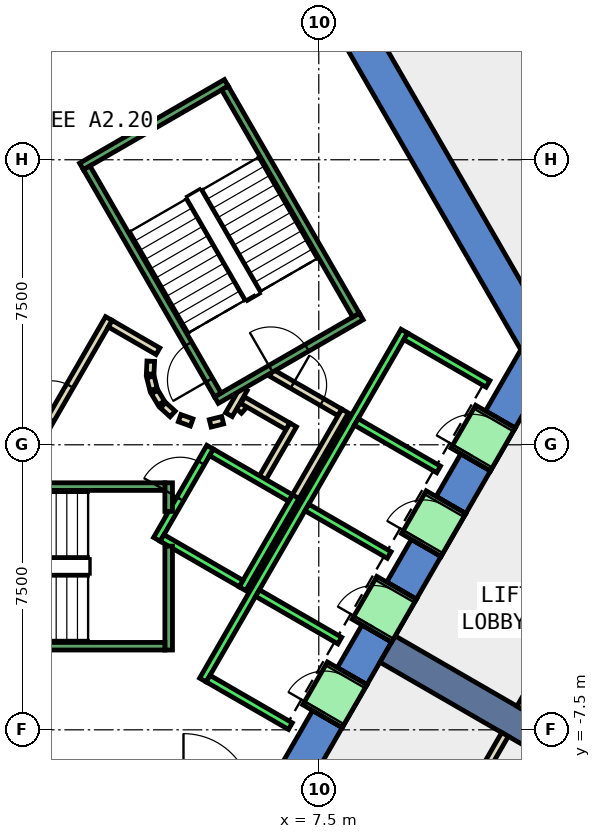
"""IFC4 building model, lengths in metres.
Left out: names, types, materials, properties, quantities, classifications, styles, units other than length and angle.
Written with IfcOpenShell. Run it as: python <this file> out.ifc"""

import sys

from ifc_helpers import new_model, si_unit, direction, frame, frame_2d, origin, place, context, subcontext, project, spatial, polyline, rectangle, outline, extrude, element, fill, save


model = new_model("IFC4")
c1 = context("Model", 3, precision=1e-05, world=origin(), true_north=direction((0.0, 1.0)))
c2 = subcontext(c1, "Body", "Model", "MODEL_VIEW")
j1 = project(units=[si_unit("LENGTHUNIT", "METRE"), si_unit("PLANEANGLEUNIT", "RADIAN")], contexts=[c1])
p1 = place(None, origin())
s1 = spatial("IfcSite", under=j1, at=p1, CompositionType="ELEMENT")
p2 = place(p1, origin())
s2 = spatial("IfcBuilding", under=s1, at=p2, CompositionType="ELEMENT")
p3 = place(p2, frame((0.0, 0.0, 90.8)))
s3 = spatial("IfcBuildingStorey", under=s2, at=p3, CompositionType="ELEMENT", Elevation=90.8)
p4 = place(p3, frame((0.0, 0.0, -0.4)))
e1 = element("IfcWall", 1, at=p4, inside=s3, PredefinedType="SHEAR", context=c2, shape_type="SweptSolid", body=[
    extrude(outline(polyline([(8.517, 11.748), (7.738, 11.298), (12.817, 2.5), (13.856, 2.5), (8.517, 11.748)])), origin(), (0.0, 0.0, 1.0), 4.2),
])
p5 = place(p3, frame((0.0, 0.0, -0.4)))
e2 = element("IfcWall", 2, at=p5, inside=s3, PredefinedType="SHEAR", context=c2, shape_type="SweptSolid", body=[
    extrude(outline(polyline([(8.117, -7.44), (7.338, -6.99), (6.409, -8.6), (6.928, -9.5), (8.117, -7.44)])), origin(), (0.0, 0.0, 1.0), 4.2),
])
p6 = place(p3, frame((0.0, 0.0, -0.4)))
e3 = element("IfcWall", 3, at=p6, inside=s3, PredefinedType="SHEAR", context=c2, shape_type="SweptSolid", body=[
    extrude(outline(polyline([(9.417, -5.189), (8.638, -4.739), (7.988, -5.864), (8.767, -6.314), (9.417, -5.189)])), origin(), (0.0, 0.0, 1.0), 4.2),
])
p7 = place(p3, frame((0.0, 0.0, -0.4)))
e4 = element("IfcWall", 4, at=p7, inside=s3, PredefinedType="SHEAR", context=c2, shape_type="SweptSolid", body=[
    extrude(outline(polyline([(10.717, -2.937), (9.938, -2.487), (9.288, -3.613), (10.067, -4.063), (10.717, -2.937)])), origin(), (0.0, 0.0, 1.0), 4.2),
])
p8 = place(p3, frame((0.0, 0.0, -0.4)))
e5 = element("IfcWall", 5, at=p8, inside=s3, PredefinedType="SHEAR", context=c2, shape_type="SweptSolid", body=[
    extrude(outline(polyline([(12.017, -0.686), (11.238, -0.236), (10.588, -1.361), (11.367, -1.811), (12.017, -0.686)])), origin(), (0.0, 0.0, 1.0), 4.2),
])
p9 = place(p3, frame((0.0, 0.0, -0.4)))
e6 = element("IfcWall", 6, at=p9, inside=s3, PredefinedType="SHEAR", context=c2, shape_type="SweptSolid", body=[
    extrude(outline(polyline([(11.888, 0.89), (12.667, 0.44), (13.856, 2.5), (12.817, 2.5), (11.888, 0.89)])), origin(), (0.0, 0.0, 1.0), 4.2),
])
p10 = place(p3, frame((0.0, 0.0, 3.6)))
e7 = element("IfcWall", 7, at=p10, inside=s3, PredefinedType="SHEAR", context=c2, shape_type="SweptSolid", body=[
    extrude(outline(polyline([(8.767, -6.314), (7.988, -5.864), (7.338, -6.99), (8.117, -7.44), (8.767, -6.314)])), origin(), (0.0, 0.0, 1.0), 0.2),
])
p11 = place(p3, frame((0.0, 0.0, 3.6)))
e8 = element("IfcWall", 8, at=p11, inside=s3, PredefinedType="SHEAR", context=c2, shape_type="SweptSolid", body=[
    extrude(outline(polyline([(10.067, -4.063), (9.288, -3.613), (8.638, -4.739), (9.417, -5.189), (10.067, -4.063)])), origin(), (0.0, 0.0, 1.0), 0.2),
])
p12 = place(p3, frame((0.0, 0.0, 3.6)))
e9 = element("IfcWall", 9, at=p12, inside=s3, PredefinedType="SHEAR", context=c2, shape_type="SweptSolid", body=[
    extrude(outline(polyline([(11.367, -1.811), (10.588, -1.361), (9.938, -2.487), (10.717, -2.937), (11.367, -1.811)])), origin(), (0.0, 0.0, 1.0), 0.2),
])
p13 = place(p3, frame((0.0, 0.0, 3.6)))
e10 = element("IfcWall", 10, at=p13, inside=s3, PredefinedType="SHEAR", context=c2, shape_type="SweptSolid", body=[
    extrude(outline(polyline([(12.667, 0.44), (11.888, 0.89), (11.238, -0.236), (12.017, -0.686), (12.667, 0.44)])), origin(), (0.0, 0.0, 1.0), 0.2),
])
p14 = place(p3, frame((9.31, -5.375, -0.4), z_axis=(0.0, 0.0, 1.0), x_axis=(0.866017533419, -0.500013631625, 0.0)))
e11 = element("IfcWall", 11, at=p14, inside=s3, PredefinedType="SHEAR", context=c2, shape_type="SweptSolid", body=[
    extrude(rectangle(XDim=9.0, YDim=0.8, at=frame_2d((4.5, 0.0))), origin(), (0.0, 0.0, 1.0), 4.2),
])
p15 = place(p3, frame((12.652, 15.602, 0.0), z_axis=(0.0, 0.0, 1.0), x_axis=(0.504914693075, -0.863169249172, 0.0)))
e12 = element("IfcWall", 12, at=p15, inside=s3, PredefinedType="PARTITIONING", context=c2, shape_type="SweptSolid", body=[
    extrude(rectangle(XDim=7.11, YDim=0.2, at=frame_2d((3.555, 0.0))), origin(), (0.0, 0.0, 1.0), 3.8),
])
p16 = place(p15, frame((3.13, 0.0, 0.0)))
e13 = element("IfcOpeningElement", 13, at=p16, cuts=e12, PredefinedType="OPENING", context=c2, shape_type="SweptSolid", body=[
    extrude(rectangle(XDim=1.0, YDim=2.1, at=frame_2d((0.5, 1.05))), frame((0.0, 0.11, 0.0), z_axis=(0.0, -1.0, 0.0), x_axis=(1.0, 0.0, 0.0)), (0.0, 0.0, 1.0), 0.22),
])
p17 = place(p3, frame((5.39, 0.898, 0.0), z_axis=(0.0, 0.0, 1.0), x_axis=(0.673828488714, 0.738887791073, 0.0)))
e14 = element("IfcWall", 14, at=p17, inside=s3, PredefinedType="PARTITIONING", context=c2, shape_type="SweptSolid", body=[
    extrude(rectangle(XDim=0.263, YDim=0.2, at=frame_2d((0.131, 0.0))), origin(), (0.0, 0.0, 1.0), 3.8),
])
p18 = place(p3, frame((5.499, 1.172, 0.0), z_axis=(0.0, 0.0, 1.0), x_axis=(0.866333505267, -0.499465972466, 0.0)))
e15 = element("IfcWall", 15, at=p18, inside=s3, PredefinedType="PARTITIONING", context=c2, shape_type="SweptSolid", body=[
    extrude(rectangle(XDim=1.374, YDim=0.2, at=frame_2d((0.687, 0.0))), origin(), (0.0, 0.0, 1.0), 3.8),
])
p19 = place(p3, frame((6.826, 0.522, 0.0), z_axis=(0.0, 0.0, 1.0), x_axis=(-0.500016722714, -0.866015748706, 0.0)))
e16 = element("IfcWall", 16, at=p19, inside=s3, PredefinedType="PARTITIONING", context=c2, shape_type="SweptSolid", body=[
    extrude(rectangle(XDim=1.7, YDim=0.2, at=frame_2d((0.85, 0.0))), origin(), (0.0, 0.0, 1.0), 3.8),
])
p20 = place(p3, frame((6.25, 1.894, 0.0), z_axis=(0.0, 0.0, 1.0), x_axis=(0.866043184279, -0.499969202016, 0.0)))
e17 = element("IfcWall", 17, at=p20, inside=s3, PredefinedType="PARTITIONING", context=c2, shape_type="SweptSolid", body=[
    extrude(rectangle(XDim=2.084, YDim=0.2, at=frame_2d((1.042, 0.0))), origin(), (0.0, 0.0, 1.0), 3.8),
])
p21 = place(p20, frame((0.642, 0.0, 0.0)))
e18 = element("IfcOpeningElement", 18, at=p21, cuts=e17, PredefinedType="OPENING", context=c2, shape_type="SweptSolid", body=[
    extrude(rectangle(XDim=0.9, YDim=2.1, at=frame_2d((0.45, 1.05))), frame((0.0, 0.11, 0.0), z_axis=(0.0, -1.0, 0.0), x_axis=(1.0, 0.0, 0.0)), (0.0, 0.0, 1.0), 0.22),
])
p22 = place(p3, frame((8.192, 0.888, 0.0), z_axis=(0.0, 0.0, 1.0), x_axis=(-0.499940625693, -0.866059680843, 0.0)))
e19 = element("IfcWall", 19, at=p22, inside=s3, PredefinedType="PARTITIONING", context=c2, shape_type="SweptSolid", body=[
    extrude(rectangle(XDim=2.68, YDim=0.2, at=frame_2d((1.34, 0.0))), origin(), (0.0, 0.0, 1.0), 3.8),
])
p23 = place(p3, frame((5.135, 0.793, 0.0), z_axis=(0.0, 0.0, 1.0), x_axis=(0.499526442893, 0.866298639529, 0.0)))
e20 = element("IfcWall", 20, at=p23, inside=s3, PredefinedType="PARTITIONING", context=c2, shape_type="SweptSolid", body=[
    extrude(rectangle(XDim=0.791, YDim=0.2, at=frame_2d((0.396, 0.0))), origin(), (0.0, 0.0, 1.0), 3.8),
])
p24 = place(p3, frame((-0.52, -1.0, 0.0), z_axis=(0.0, 0.0, 1.0), x_axis=(0.50011622646, 0.865958290007, 0.0)))
e21 = element("IfcWall", 21, at=p24, inside=s3, PredefinedType="PARTITIONING", context=c2, shape_type="SweptSolid", body=[
    extrude(rectangle(XDim=4.991, YDim=0.2, at=frame_2d((2.496, 0.0))), origin(), (0.0, 0.0, 1.0), 3.8),
])
p25 = place(p24, frame((1.945, 0.0, 0.0)))
e22 = element("IfcOpeningElement", 22, at=p25, cuts=e21, PredefinedType="OPENING", context=c2, shape_type="SweptSolid", body=[
    extrude(rectangle(XDim=1.0, YDim=2.1, at=frame_2d((0.5, 1.05))), frame((0.0, 0.11, 0.0), z_axis=(0.0, -1.0, 0.0), x_axis=(1.0, 0.0, 0.0)), (0.0, 0.0, 1.0), 0.22),
])
p26 = place(p3, frame((2.012, 3.186, 0.0), z_axis=(0.0, 0.0, 1.0), x_axis=(0.865891012941, -0.500232699559, 0.0)))
e23 = element("IfcWall", 23, at=p26, inside=s3, PredefinedType="PARTITIONING", context=c2, shape_type="SweptSolid", body=[
    extrude(rectangle(XDim=1.449, YDim=0.2, at=frame_2d((0.725, 0.0))), origin(), (0.0, 0.0, 1.0), 3.8),
])
p27 = place(p3, frame((3.079, 2.199, 0.0), z_axis=(0.0, 0.0, 1.0), x_axis=(-0.047771483479, -0.998858290933, 0.0)))
e24 = element("IfcWall", 24, at=p27, inside=s3, PredefinedType="PARTITIONING", context=c2, shape_type="SweptSolid", body=[
    extrude(rectangle(XDim=0.337, YDim=0.2, at=frame_2d((0.169, 0.0))), origin(), (0.0, 0.0, 1.0), 3.8),
])
p28 = place(p3, frame((3.07, 1.786, 0.0), z_axis=(0.0, 0.0, 1.0), x_axis=(0.242705583207, -0.970099994784, 0.0)))
e25 = element("IfcWall", 25, at=p28, inside=s3, PredefinedType="PARTITIONING", context=c2, shape_type="SweptSolid", body=[
    extrude(rectangle(XDim=0.338, YDim=0.2, at=frame_2d((0.169, 0.0))), origin(), (0.0, 0.0, 1.0), 3.8),
])
for number, where, z_axis, x_axis in (
    (26, (3.182, 1.388, 0.0), (0.0, 0.0, 1.0), (0.512, -0.859, 0.0)),
    (27, (3.404, 1.039, 0.0), (0.0, 0.0, 1.0), (0.74, -0.672, 0.0)),
):
    element("IfcWall", number, at=place(p3, frame(where, z_axis=z_axis, x_axis=x_axis)), inside=s3, PredefinedType="PARTITIONING", context=c2, shape_type="SweptSolid", body=[
        extrude(rectangle(XDim=0.338, YDim=0.2, at=frame_2d((0.169, 0.0))), origin(), (0.0, 0.0, 1.0), 3.8),
    ])
p29 = place(p3, frame((3.838, 0.702, 0.0), z_axis=(0.0, 0.0, 1.0), x_axis=(0.941035081519, -0.338308993895, 0.0)))
e28 = element("IfcWall", 28, at=p29, inside=s3, PredefinedType="PARTITIONING", context=c2, shape_type="SweptSolid", body=[
    extrude(rectangle(XDim=0.337, YDim=0.2, at=frame_2d((0.168, 0.0))), origin(), (0.0, 0.0, 1.0), 3.8),
])
p30 = place(p3, frame((4.644, 0.564, 0.0), z_axis=(0.0, 0.0, 1.0), x_axis=(0.969929076366, 0.243387729394, 0.0)))
e29 = element("IfcWall", 29, at=p30, inside=s3, PredefinedType="PARTITIONING", context=c2, shape_type="SweptSolid", body=[
    extrude(rectangle(XDim=0.337, YDim=0.2, at=frame_2d((0.168, 0.0))), origin(), (0.0, 0.0, 1.0), 3.8),
])
p31 = place(p3, frame((18.009, 2.092, 0.0), z_axis=(0.0, 0.0, 1.0), x_axis=(-0.499980796252, -0.866036490789, 0.0)))
e30 = element("IfcWall", 30, at=p31, inside=s3, PredefinedType="PARTITIONING", context=c2, shape_type="SweptSolid", body=[
    extrude(rectangle(XDim=10.417, YDim=0.2, at=frame_2d((5.208, 0.0))), origin(), (0.0, 0.0, 1.0), 3.8),
])
p32 = place(p3, frame((12.401, -7.621, 0.0), z_axis=(0.0, 0.0, 1.0), x_axis=(-0.499983724212, -0.866034800411, 0.0)))
e31 = element("IfcWall", 31, at=p32, inside=s3, PredefinedType="PARTITIONING", context=c2, shape_type="SweptSolid", body=[
    extrude(rectangle(XDim=9.302, YDim=0.2, at=frame_2d((4.651, 0.0))), origin(), (0.0, 0.0, 1.0), 3.8),
])
p33 = place(p3, frame((3.24, -2.488, 0.0), z_axis=(0.0, 0.0, 1.0), x_axis=(0.49994636267, 0.866056369097, 0.0)))
e32 = element("IfcWall", 32, at=p33, inside=s3, PredefinedType="STANDARD", context=c2, shape_type="SweptSolid", body=[
    extrude(rectangle(XDim=2.8, YDim=0.2, at=frame_2d((1.4, 0.0))), origin(), (0.0, 0.0, 1.0), 3.8),
])
p34 = place(p33, frame((1.225, 0.0, 0.0)))
e33 = element("IfcOpeningElement", 33, at=p34, cuts=e32, PredefinedType="OPENING", context=c2, shape_type="SweptSolid", body=[
    extrude(rectangle(XDim=1.1, YDim=2.1, at=frame_2d((0.55, 1.05))), frame((0.0, 0.11, 0.0), z_axis=(0.0, -1.0, 0.0), x_axis=(1.0, 0.0, 0.0)), (0.0, 0.0, 1.0), 0.22),
])
p35 = place(p3, frame((5.492, -3.788, 0.0), z_axis=(0.0, 0.0, 1.0), x_axis=(0.500011755427, 0.866018616679, 0.0)))
e34 = element("IfcWall", 34, at=p35, inside=s3, PredefinedType="STANDARD", context=c2, shape_type="SweptSolid", body=[
    extrude(rectangle(XDim=2.8, YDim=0.2, at=frame_2d((1.4, 0.0))), origin(), (0.0, 0.0, 1.0), 3.8),
])
p36 = place(p3, frame((3.377, -2.452, 0.0), z_axis=(0.0, 0.0, 1.0), x_axis=(0.865955154139, -0.50012165622, 0.0)))
e35 = element("IfcWall", 35, at=p36, inside=s3, PredefinedType="STANDARD", context=c2, shape_type="SweptSolid", body=[
    extrude(rectangle(XDim=2.4, YDim=0.2, at=frame_2d((1.2, 0.0))), origin(), (0.0, 0.0, 1.0), 3.8),
])
p37 = place(p3, frame((4.677, -0.2, 0.0), z_axis=(0.0, 0.0, 1.0), x_axis=(0.865973769406, -0.500089422704, 0.0)))
e36 = element("IfcWall", 36, at=p37, inside=s3, PredefinedType="STANDARD", context=c2, shape_type="SweptSolid", body=[
    extrude(rectangle(XDim=2.399, YDim=0.2, at=frame_2d((1.2, 0.0))), origin(), (0.0, 0.0, 1.0), 3.8),
])
p38 = place(p3, frame((4.451, -6.19, 0.0), z_axis=(0.0, 0.0, 1.0), x_axis=(0.50000090737, 0.866024879913, 0.0)))
e37 = element("IfcWall", 37, at=p38, inside=s3, PredefinedType="STANDARD", context=c2, shape_type="SweptSolid", body=[
    extrude(rectangle(XDim=10.6, YDim=0.2, at=frame_2d((5.3, 0.0))), origin(), (0.0, 0.0, 1.0), 3.8),
])
for number, where, z_axis, x_axis in (
    (38, (4.588, -6.153, 0.0), (0.0, 0.0, 1.0), (0.866, -0.5, 0.0)),
    (39, (5.888, -3.902, 0.0), (0.0, 0.0, 1.0), (0.866, -0.5, 0.0)),
    (40, (7.188, -1.65, 0.0), (0.0, 0.0, 1.0), (0.866, -0.5, 0.0)),
    (41, (8.488, 0.602, 0.0), (0.0, 0.0, 1.0), (0.866, -0.5, 0.0)),
):
    element("IfcWall", number, at=place(p3, frame(where, z_axis=z_axis, x_axis=x_axis)), inside=s3, PredefinedType="STANDARD", context=c2, shape_type="SweptSolid", body=[
        extrude(rectangle(XDim=2.5, YDim=0.2, at=frame_2d((1.25, 0.0))), origin(), (0.0, 0.0, 1.0), 3.8),
    ])
p39 = place(p3, frame((9.788, 2.853, 0.0), z_axis=(0.0, 0.0, 1.0), x_axis=(0.865998541277, -0.500046524342, 0.0)))
e42 = element("IfcWall", 42, at=p39, inside=s3, PredefinedType="STANDARD", context=c2, shape_type="SweptSolid", body=[
    extrude(rectangle(XDim=2.5, YDim=0.2, at=frame_2d((1.25, 0.0))), origin(), (0.0, 0.0, 1.0), 3.8),
])
p40 = place(p3, frame((7.598, -7.14, 0.0), z_axis=(0.0, 0.0, 1.0), x_axis=(0.500362116554, 0.865816234728, 0.0)))
e43 = element("IfcWall", 43, at=p40, inside=s3, PredefinedType="STANDARD", context=c2, shape_type="SweptSolid", body=[
    extrude(rectangle(XDim=1.299, YDim=1.2, at=frame_2d((0.65, 0.0))), origin(), (0.0, 0.0, 1.0), 2.4),
])
p41 = place(p40, frame((0.1, 0.0, 0.0)))
e44 = element("IfcOpeningElement", 44, at=p41, cuts=e43, PredefinedType="OPENING", context=c2, shape_type="SweptSolid", body=[
    extrude(rectangle(XDim=1.1, YDim=2.3, at=frame_2d((0.55, 1.15))), frame((0.0, 0.61, 0.0), z_axis=(0.0, -1.0, 0.0), x_axis=(1.0, 0.0, 0.0)), (0.0, 0.0, 1.0), 1.22),
])
p42 = place(p3, frame((8.898, -4.889, 0.0), z_axis=(0.0, 0.0, 1.0), x_axis=(0.500036693733, 0.866004217611, 0.0)))
e45 = element("IfcWall", 45, at=p42, inside=s3, PredefinedType="STANDARD", context=c2, shape_type="SweptSolid", body=[
    extrude(rectangle(XDim=1.3, YDim=1.2, at=frame_2d((0.65, 0.0))), origin(), (0.0, 0.0, 1.0), 2.4),
])
p43 = place(p42, frame((0.1, 0.0, 0.0)))
e46 = element("IfcOpeningElement", 46, at=p43, cuts=e45, PredefinedType="OPENING", context=c2, shape_type="SweptSolid", body=[
    extrude(rectangle(XDim=1.1, YDim=2.3, at=frame_2d((0.55, 1.15))), frame((0.0, 0.61, 0.0), z_axis=(0.0, -1.0, 0.0), x_axis=(1.0, 0.0, 0.0)), (0.0, 0.0, 1.0), 1.22),
])
p44 = place(p3, frame((10.198, -2.637, 0.0), z_axis=(0.0, 0.0, 1.0), x_axis=(0.49989585183, 0.866085525409, 0.0)))
e47 = element("IfcWall", 47, at=p44, inside=s3, PredefinedType="STANDARD", context=c2, shape_type="SweptSolid", body=[
    extrude(rectangle(XDim=1.3, YDim=1.2, at=frame_2d((0.65, 0.0))), origin(), (0.0, 0.0, 1.0), 2.4),
])
p45 = place(p44, frame((0.1, 0.0, 0.0)))
e48 = element("IfcOpeningElement", 48, at=p45, cuts=e47, PredefinedType="OPENING", context=c2, shape_type="SweptSolid", body=[
    extrude(rectangle(XDim=1.1, YDim=2.3, at=frame_2d((0.55, 1.15))), frame((0.0, 0.61, 0.0), z_axis=(0.0, -1.0, 0.0), x_axis=(1.0, 0.0, 0.0)), (0.0, 0.0, 1.0), 1.22),
])
p46 = place(p3, frame((11.498, -0.385, 0.0), z_axis=(0.0, 0.0, 1.0), x_axis=(0.500221244143, 0.865897630733, 0.0)))
e49 = element("IfcWall", 49, at=p46, inside=s3, PredefinedType="STANDARD", context=c2, shape_type="SweptSolid", body=[
    extrude(rectangle(XDim=1.299, YDim=1.2, at=frame_2d((0.65, 0.0))), origin(), (0.0, 0.0, 1.0), 2.4),
])
p47 = place(p46, frame((0.1, 0.0, 0.0)))
e50 = element("IfcOpeningElement", 50, at=p47, cuts=e49, PredefinedType="OPENING", context=c2, shape_type="SweptSolid", body=[
    extrude(rectangle(XDim=1.1, YDim=2.3, at=frame_2d((0.55, 1.15))), frame((0.0, 0.61, 0.0), z_axis=(0.0, -1.0, 0.0), x_axis=(1.0, 0.0, 0.0)), (0.0, 0.0, 1.0), 1.22),
])
p48 = place(p3, frame((3.55, -2.667, 0.0), z_axis=(0.0, 0.0, 1.0), x_axis=(0.0, -1.0, 0.0)))
e51 = element("IfcWall", 51, at=p48, inside=s3, PredefinedType="STANDARD", context=c2, shape_type="SweptSolid", body=[
    extrude(rectangle(XDim=2.733, YDim=0.2, at=frame_2d((1.366, 0.0))), origin(), (0.0, 0.0, 1.0), 3.8),
])
p49 = place(p3, frame((3.55, -1.0, 0.0), z_axis=(0.0, 0.0, 1.0), x_axis=(0.0, -1.0, 0.0)))
e52 = element("IfcWall", 52, at=p49, inside=s3, PredefinedType="STANDARD", context=c2, shape_type="SweptSolid", body=[
    extrude(rectangle(XDim=0.751, YDim=0.2, at=frame_2d((0.375, 0.0))), origin(), (0.0, 0.0, 1.0), 3.8),
])
p50 = place(p3, frame((-3.45, -1.1, 0.0), z_axis=(0.0, 0.0, 1.0), x_axis=(1.0, 0.0, 0.0)))
e53 = element("IfcWall", 53, at=p50, inside=s3, PredefinedType="STANDARD", context=c2, shape_type="SweptSolid", body=[
    extrude(rectangle(XDim=6.9, YDim=0.2, at=frame_2d((3.45, 0.0))), origin(), (0.0, 0.0, 1.0), 3.8),
])
p51 = place(p50, frame((0.45, 0.0, 0.0)))
e54 = element("IfcOpeningElement", 54, at=p51, cuts=e53, PredefinedType="OPENING", context=c2, shape_type="SweptSolid", body=[
    extrude(rectangle(XDim=1.1, YDim=2.2, at=frame_2d((0.55, 1.1))), frame((0.0, 0.11, 0.0), z_axis=(0.0, -1.0, 0.0), x_axis=(1.0, 0.0, 0.0)), (0.0, 0.0, 1.0), 0.22),
])
p52 = place(p3, frame((-3.45, -5.3, 0.0), z_axis=(0.0, 0.0, 1.0), x_axis=(1.0, 0.0, 0.0)))
e55 = element("IfcWall", 55, at=p52, inside=s3, PredefinedType="STANDARD", context=c2, shape_type="SweptSolid", body=[
    extrude(rectangle(XDim=6.9, YDim=0.2, at=frame_2d((3.45, 0.0))), origin(), (0.0, 0.0, 1.0), 3.8),
])
p53 = place(p3, frame((4.806, 1.176, 0.0), z_axis=(0.0, 0.0, 1.0), x_axis=(0.866059941101, 0.499940174841, 0.0)))
e56 = element("IfcWall", 56, at=p53, inside=s3, PredefinedType="STANDARD", context=c2, shape_type="SweptSolid", body=[
    extrude(rectangle(XDim=4.4, YDim=0.2, at=frame_2d((2.2, 0.0))), origin(), (0.0, 0.0, 1.0), 3.8),
])
p54 = place(p53, frame((1.65, 0.0, 0.0)))
e57 = element("IfcOpeningElement", 57, at=p54, cuts=e56, PredefinedType="OPENING", context=c2, shape_type="SweptSolid", body=[
    extrude(rectangle(XDim=1.1, YDim=2.2, at=frame_2d((0.55, 1.1))), frame((0.0, 0.11, 0.0), z_axis=(0.0, -1.0, 0.0), x_axis=(1.0, 0.0, 0.0)), (0.0, 0.0, 1.0), 0.22),
])
p55 = place(p3, frame((1.256, 7.324, 0.0), z_axis=(0.0, 0.0, 1.0), x_axis=(0.866046073146, 0.499964197906, 0.0)))
e58 = element("IfcWall", 58, at=p55, inside=s3, PredefinedType="STANDARD", context=c2, shape_type="SweptSolid", body=[
    extrude(rectangle(XDim=4.4, YDim=0.2, at=frame_2d((2.2, 0.0))), origin(), (0.0, 0.0, 1.0), 3.8),
])
p56 = place(p3, frame((4.843, 1.312, 0.0), z_axis=(0.0, 0.0, 1.0), x_axis=(-0.499963383562, 0.866046543262, 0.0)))
e59 = element("IfcWall", 59, at=p56, inside=s3, PredefinedType="STANDARD", context=c2, shape_type="SweptSolid", body=[
    extrude(rectangle(XDim=6.9, YDim=0.2, at=frame_2d((3.45, 0.0))), origin(), (0.0, 0.0, 1.0), 3.8),
])
p57 = place(p56, frame((0.45, 0.0, 0.0)))
e60 = element("IfcOpeningElement", 60, at=p57, cuts=e59, PredefinedType="OPENING", context=c2, shape_type="SweptSolid", body=[
    extrude(rectangle(XDim=1.1, YDim=2.2, at=frame_2d((0.55, 1.1))), frame((0.0, 0.11, 0.0), z_axis=(0.0, -1.0, 0.0), x_axis=(1.0, 0.0, 0.0)), (0.0, 0.0, 1.0), 0.22),
])
p58 = place(p3, frame((8.48, 3.412, 0.0), z_axis=(0.0, 0.0, 1.0), x_axis=(-0.499978703459, 0.866037698999, 0.0)))
e61 = element("IfcWall", 61, at=p58, inside=s3, PredefinedType="STANDARD", context=c2, shape_type="SweptSolid", body=[
    extrude(rectangle(XDim=6.9, YDim=0.2, at=frame_2d((3.45, 0.0))), origin(), (0.0, 0.0, 1.0), 3.8),
])
p59 = place(p25, origin())
e62 = element("IfcDoor", 62, at=p59, inside=s3, OperationType="SINGLE_SWING_LEFT", PredefinedType="DOOR", context=c2, shape_type="SweptSolid", body=[
    extrude(rectangle(XDim=1.0, YDim=2.1, at=frame_2d((0.5, 1.05))), frame((0.0, 0.025, 0.0), z_axis=(0.0, -1.0, 0.0), x_axis=(1.0, 0.0, 0.0)), (0.0, 0.0, 1.0), 0.05),
])
fill(e22, e62)
p60 = place(p21, origin())
e63 = element("IfcDoor", 63, at=p60, inside=s3, OperationType="SINGLE_SWING_LEFT", PredefinedType="DOOR", context=c2, shape_type="SweptSolid", body=[
    extrude(rectangle(XDim=0.9, YDim=2.1, at=frame_2d((0.45, 1.05))), frame((0.0, 0.025, 0.0), z_axis=(0.0, -1.0, 0.0), x_axis=(1.0, 0.0, 0.0)), (0.0, 0.0, 1.0), 0.05),
])
fill(e18, e63)
p61 = place(p41, origin())
e64 = element("IfcDoor", 64, at=p61, inside=s3, OperationType="SLIDING_TO_LEFT", PredefinedType="DOOR", context=c2, shape_type="SweptSolid", body=[
    extrude(rectangle(XDim=1.1, YDim=2.3, at=frame_2d((0.55, 1.15))), frame((0.0, 0.025, 0.0), z_axis=(0.0, -1.0, 0.0), x_axis=(1.0, 0.0, 0.0)), (0.0, 0.0, 1.0), 0.05),
])
fill(e44, e64)
p62 = place(p43, origin())
e65 = element("IfcDoor", 65, at=p62, inside=s3, OperationType="SLIDING_TO_LEFT", PredefinedType="DOOR", context=c2, shape_type="SweptSolid", body=[
    extrude(rectangle(XDim=1.1, YDim=2.3, at=frame_2d((0.55, 1.15))), frame((0.0, 0.025, 0.0), z_axis=(0.0, -1.0, 0.0), x_axis=(1.0, 0.0, 0.0)), (0.0, 0.0, 1.0), 0.05),
])
fill(e46, e65)
p63 = place(p45, origin())
e66 = element("IfcDoor", 66, at=p63, inside=s3, OperationType="SLIDING_TO_LEFT", PredefinedType="DOOR", context=c2, shape_type="SweptSolid", body=[
    extrude(rectangle(XDim=1.1, YDim=2.3, at=frame_2d((0.55, 1.15))), frame((0.0, 0.025, 0.0), z_axis=(0.0, -1.0, 0.0), x_axis=(1.0, 0.0, 0.0)), (0.0, 0.0, 1.0), 0.05),
])
fill(e48, e66)
p64 = place(p47, origin())
e67 = element("IfcDoor", 67, at=p64, inside=s3, OperationType="SLIDING_TO_LEFT", PredefinedType="DOOR", context=c2, shape_type="SweptSolid", body=[
    extrude(rectangle(XDim=1.1, YDim=2.3, at=frame_2d((0.55, 1.15))), frame((0.0, 0.025, 0.0), z_axis=(0.0, -1.0, 0.0), x_axis=(1.0, 0.0, 0.0)), (0.0, 0.0, 1.0), 0.05),
])
fill(e50, e67)
p65 = place(p34, origin())
e68 = element("IfcDoor", 68, at=p65, inside=s3, OperationType="SLIDING_TO_LEFT", PredefinedType="DOOR", context=c2, shape_type="SweptSolid", body=[
    extrude(rectangle(XDim=1.1, YDim=2.1, at=frame_2d((0.55, 1.05))), frame((0.0, 0.025, 0.0), z_axis=(0.0, -1.0, 0.0), x_axis=(1.0, 0.0, 0.0)), (0.0, 0.0, 1.0), 0.05),
])
fill(e33, e68)
p66 = place(p57, origin())
e69 = element("IfcDoor", 69, at=p66, inside=s3, OperationType="SINGLE_SWING_LEFT", PredefinedType="DOOR", context=c2, shape_type="SweptSolid", body=[
    extrude(rectangle(XDim=1.1, YDim=2.2, at=frame_2d((0.55, 1.1))), frame((0.0, 0.025, 0.0), z_axis=(0.0, -1.0, 0.0), x_axis=(1.0, 0.0, 0.0)), (0.0, 0.0, 1.0), 0.05),
])
fill(e60, e69)
p67 = place(p54, origin())
e70 = element("IfcDoor", 70, at=p67, inside=s3, OperationType="SINGLE_SWING_LEFT", PredefinedType="DOOR", context=c2, shape_type="SweptSolid", body=[
    extrude(rectangle(XDim=1.1, YDim=2.2, at=frame_2d((0.55, 1.1))), frame((0.0, 0.025, 0.0), z_axis=(0.0, -1.0, 0.0), x_axis=(1.0, 0.0, 0.0)), (0.0, 0.0, 1.0), 0.05),
])
fill(e57, e70)
save(model, sys.argv[1])
